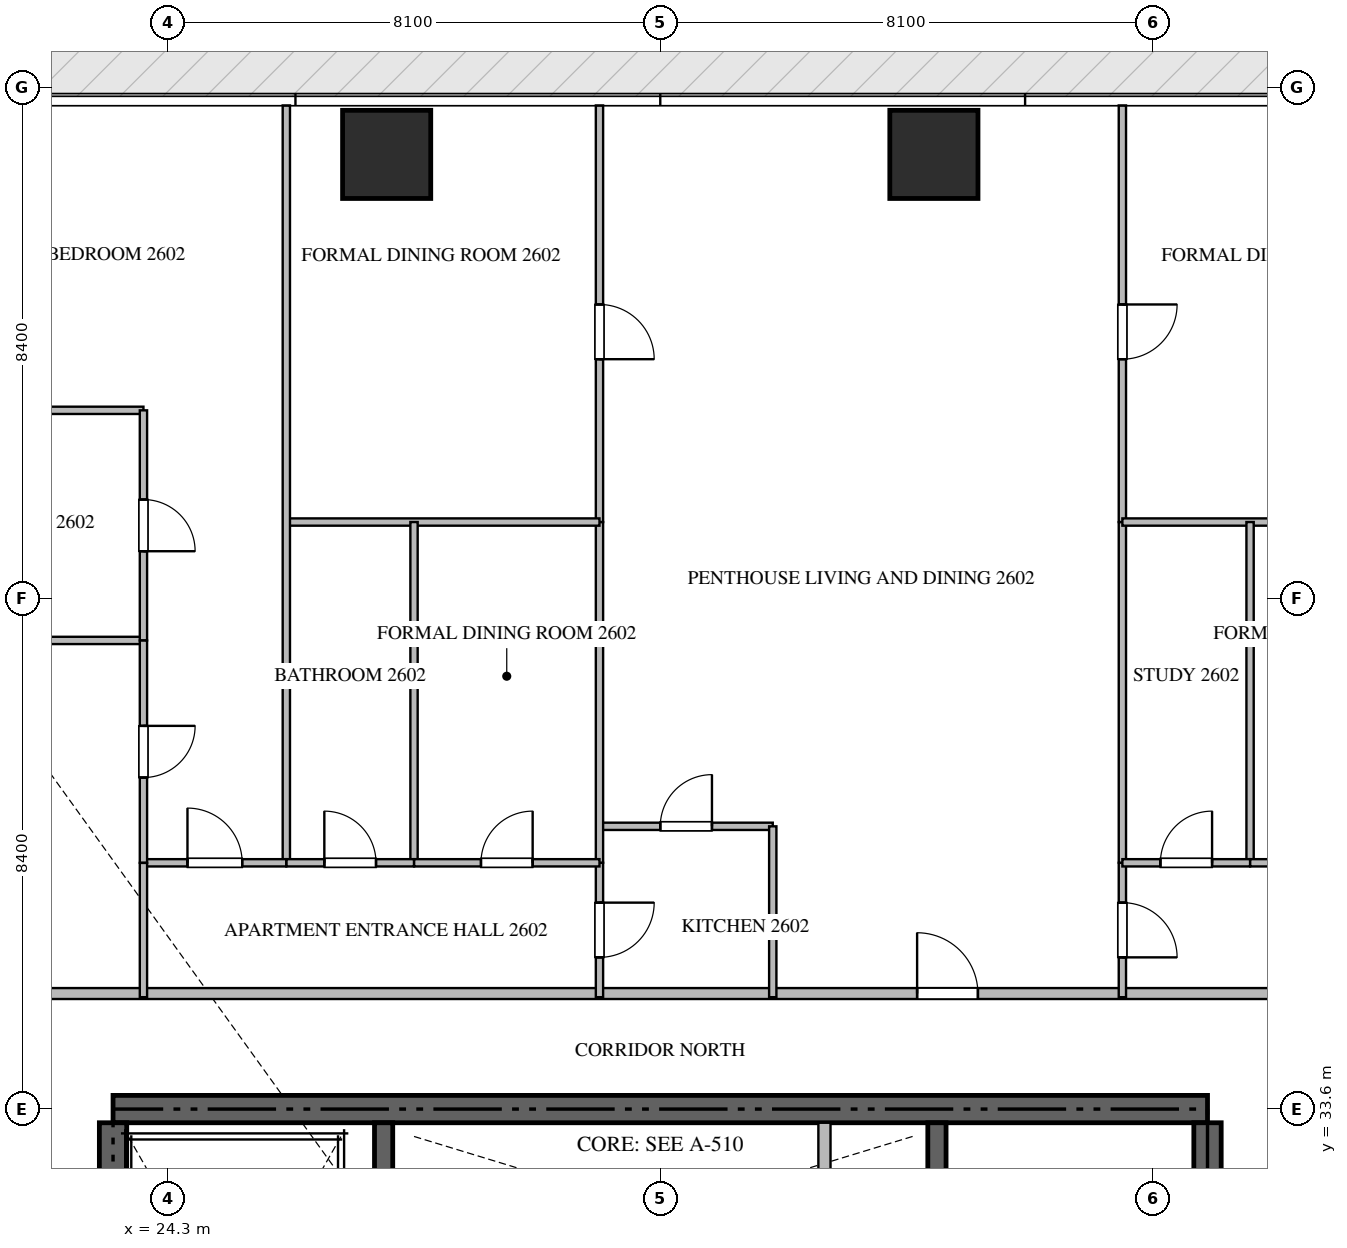
"""IFC4 building model, lengths in metres.
Left out: names, types, materials, properties, quantities, classifications, styles, units other than length and angle.
Written with IfcOpenShell. Run it as: python <this file> out.ifc"""

import sys

from ifc_helpers import new_model, si_unit, direction, frame, frame_2d, origin, origin_2d, place, context, subcontext, project, spatial, rectangle, extrude, source, transform, mapped, element, fill, save


model = new_model("IFC4")
c1 = context("Model", 3, precision=1e-05, world=origin(), true_north=direction((0.0, 1.0)))
c2 = subcontext(c1, "Body", "Model", "MODEL_VIEW")
j1 = project(units=[si_unit("LENGTHUNIT", "METRE"), si_unit("PLANEANGLEUNIT", "RADIAN")], contexts=[c1])
p1 = place(None, origin())
s1 = spatial("IfcSite", under=j1, at=p1, CompositionType="ELEMENT")
p2 = place(p1, origin())
s2 = spatial("IfcBuilding", under=s1, at=p2, CompositionType="ELEMENT")
p3 = place(p2, frame((0.0, 0.0, 105.45)))
s3 = spatial("IfcBuildingStorey", under=s2, at=p3, CompositionType="ELEMENT", Elevation=105.45)
p4 = place(p3, frame((41.4, 33.6, -0.26), z_axis=(0.0, 0.0, 1.0), x_axis=(-1.0, 0.0, 0.0)))
e1 = element("IfcWall", 1, at=p4, inside=s3, PredefinedType="SHEAR", context=c2, shape_type="SweptSolid", body=[
    extrude(rectangle(XDim=18.0, YDim=0.45, at=frame_2d((9.0, 0.0))), origin(), (0.0, 0.0, 1.0), 3.648),
])
p5 = place(p3, frame((23.4, 24.25, -0.26), z_axis=(0.0, 0.0, 1.0), x_axis=(0.0, 1.0, 0.0)))
e2 = element("IfcWall", 2, at=p5, inside=s3, PredefinedType="SHEAR", context=c2, shape_type="SweptSolid", body=[
    extrude(rectangle(XDim=9.125, YDim=0.45, at=frame_2d((4.562, 0.0))), origin(), (0.0, 0.0, 1.0), 3.648),
])
p6 = place(p3, frame((41.4, 27.75, -0.26), z_axis=(0.0, 0.0, 1.0), x_axis=(0.0, 1.0, 0.0)))
e3 = element("IfcWall", 3, at=p6, inside=s3, PredefinedType="SHEAR", context=c2, shape_type="SweptSolid", body=[
    extrude(rectangle(XDim=5.625, YDim=0.45, at=frame_2d((2.812, 0.0))), origin(), (0.0, 0.0, 1.0), 3.648),
])
p7 = place(p3, frame((27.85, 23.55, -0.26), z_axis=(0.0, 0.0, 1.0), x_axis=(0.0, 1.0, 0.0)))
e4 = element("IfcWall", 4, at=p7, inside=s3, PredefinedType="SHEAR", context=c2, shape_type="SweptSolid", body=[
    extrude(rectangle(XDim=9.825, YDim=0.3, at=frame_2d((4.913, 0.0))), origin(), (0.0, 0.0, 1.0), 3.648),
])
p8 = place(p3, frame((36.95, 27.05, -0.26), z_axis=(0.0, 0.0, 1.0), x_axis=(0.0, 1.0, 0.0)))
e5 = element("IfcWall", 5, at=p8, inside=s3, PredefinedType="SHEAR", context=c2, shape_type="SweptSolid", body=[
    extrude(rectangle(XDim=6.325, YDim=0.3, at=frame_2d((3.163, 0.0))), origin(), (0.0, 0.0, 1.0), 3.648),
])
m1 = source(origin(), c2, "Body", "SweptSolid", [
    extrude(rectangle(XDim=1.45, YDim=1.45, at=origin_2d()), origin(), (0.0, 0.0, 1.0), 3.65),
])
for number, where, z_axis, x_axis in (
    (6, (27.9, 49.3, -0.26), (0.0, 0.0, 1.0), (1.0, 0.0, 0.0)),
    (7, (36.9, 49.3, -0.26), (0.0, 0.0, 1.0), (1.0, 0.0, 0.0)),
):
    element("IfcColumn", number, at=place(p3, frame(where, z_axis=z_axis, x_axis=x_axis)), inside=s3, PredefinedType="COLUMN", context=c2, shape_type="MappedRepresentation", body=[
        mapped(m1, transform((0.0, 0.0, 0.0), scale=1.0)),
    ])
p9 = place(p3, frame((35.1, 30.75, 0.0), z_axis=(0.0, 0.0, 1.0), x_axis=(0.0, 1.0, 0.0)))
e8 = element("IfcWall", 8, at=p9, inside=s3, PredefinedType="STANDARD", context=c2, shape_type="SweptSolid", body=[
    extrude(rectangle(XDim=2.625, YDim=0.2, at=frame_2d((1.312, 0.0))), origin(), (0.0, 0.0, 1.0), 3.39),
])
p10 = place(p3, frame((21.402, 35.5, 0.0), z_axis=(0.0, 0.0, 1.0), x_axis=(1.0, 0.0, 0.0)))
e9 = element("IfcWall", 9, at=p10, inside=s3, PredefinedType="PARTITIONING", context=c2, shape_type="SweptSolid", body=[
    extrude(rectangle(XDim=21.996, YDim=0.18, at=frame_2d((10.998, 0.0))), origin(), (0.0, 0.0, 1.0), 3.39),
])
p11 = place(p10, frame((15.222, 0.0, 0.0)))
e10 = element("IfcOpeningElement", 10, at=p11, cuts=e9, PredefinedType="OPENING", context=c2, shape_type="SweptSolid", body=[
    extrude(rectangle(XDim=1.0, YDim=2.15, at=frame_2d((0.5, 1.075))), frame((0.0, 0.1, 0.0), z_axis=(0.0, -1.0, 0.0), x_axis=(1.0, 0.0, 0.0)), (0.0, 0.0, 1.0), 0.2),
])
p12 = place(p3, frame((31.4, 38.25, 0.0), z_axis=(0.0, 0.0, 1.0), x_axis=(1.0, 0.0, 0.0)))
e11 = element("IfcWall", 11, at=p12, inside=s3, PredefinedType="PARTITIONING", context=c2, shape_type="SweptSolid", body=[
    extrude(rectangle(XDim=2.85, YDim=0.12, at=frame_2d((1.425, 0.0))), origin(), (0.0, 0.0, 1.0), 3.39),
])
p13 = place(p12, frame((1.0, 0.0, 0.0)))
e12 = element("IfcOpeningElement", 12, at=p13, cuts=e11, PredefinedType="OPENING", context=c2, shape_type="SweptSolid", body=[
    extrude(rectangle(XDim=0.85, YDim=2.1, at=frame_2d((0.425, 1.05))), frame((0.0, 0.07, 0.0), z_axis=(0.0, -1.0, 0.0), x_axis=(1.0, 0.0, 0.0)), (0.0, 0.0, 1.0), 0.14),
])
p14 = place(p3, frame((34.25, 38.25, 0.0), z_axis=(0.0, 0.0, 1.0), x_axis=(0.0, -1.0, 0.0)))
e13 = element("IfcWall", 13, at=p14, inside=s3, PredefinedType="PARTITIONING", context=c2, shape_type="SweptSolid", body=[
    extrude(rectangle(XDim=2.81, YDim=0.12, at=frame_2d((1.405, 0.0))), origin(), (0.0, 0.0, 1.0), 3.39),
])
p15 = place(p3, frame((31.4, 37.65, 0.0), z_axis=(0.0, 0.0, 1.0), x_axis=(0.0, -1.0, 0.0)))
e14 = element("IfcWall", 14, at=p15, inside=s3, PredefinedType="PARTITIONING", context=c2, shape_type="SweptSolid", body=[
    extrude(rectangle(XDim=2.21, YDim=0.12, at=frame_2d((1.105, 0.0))), origin(), (0.0, 0.0, 1.0), 3.39),
])
p16 = place(p15, frame((0.655, 0.0, 0.0)))
e15 = element("IfcOpeningElement", 15, at=p16, cuts=e14, PredefinedType="OPENING", context=c2, shape_type="SweptSolid", body=[
    extrude(rectangle(XDim=0.9, YDim=2.1, at=frame_2d((0.45, 1.05))), frame((0.0, 0.07, 0.0), z_axis=(0.0, -1.0, 0.0), x_axis=(1.0, 0.0, 0.0)), (0.0, 0.0, 1.0), 0.14),
])
p17 = place(p3, frame((31.4, 50.105, 0.0), z_axis=(0.0, 0.0, 1.0), x_axis=(0.0, -1.0, 0.0)))
e16 = element("IfcWall", 16, at=p17, inside=s3, PredefinedType="PARTITIONING", context=c2, shape_type="SweptSolid", body=[
    extrude(rectangle(XDim=6.851, YDim=0.12, at=frame_2d((3.426, 0.0))), origin(), (0.0, 0.0, 1.0), 3.39),
])
p18 = place(p17, frame((3.273, 0.0, 0.0)))
e17 = element("IfcOpeningElement", 17, at=p18, cuts=e16, PredefinedType="OPENING", context=c2, shape_type="SweptSolid", body=[
    extrude(rectangle(XDim=0.9, YDim=2.1, at=frame_2d((0.45, 1.05))), frame((0.0, 0.07, 0.0), z_axis=(0.0, -1.0, 0.0), x_axis=(1.0, 0.0, 0.0)), (0.0, 0.0, 1.0), 0.14),
])
p19 = place(p3, frame((31.4, 43.252, 0.0), z_axis=(0.0, 0.0, 1.0), x_axis=(0.0, -1.0, 0.0)))
e18 = element("IfcWall", 18, at=p19, inside=s3, PredefinedType="PARTITIONING", context=c2, shape_type="SweptSolid", body=[
    extrude(rectangle(XDim=5.6, YDim=0.12, at=frame_2d((2.8, 0.0))), origin(), (0.0, 0.0, 1.0), 3.39),
])
p20 = place(p3, frame((26.25, 43.254, 0.0), z_axis=(0.0, 0.0, 1.0), x_axis=(1.0, 0.0, 0.0)))
e19 = element("IfcWall", 19, at=p20, inside=s3, PredefinedType="PARTITIONING", context=c2, shape_type="SweptSolid", body=[
    extrude(rectangle(XDim=5.15, YDim=0.12, at=frame_2d((2.575, 0.0))), origin(), (0.0, 0.0, 1.0), 3.39),
])
p21 = place(p3, frame((26.25, 50.105, 0.0), z_axis=(0.0, 0.0, 1.0), x_axis=(0.0, -1.0, 0.0)))
e20 = element("IfcWall", 20, at=p21, inside=s3, PredefinedType="PARTITIONING", context=c2, shape_type="SweptSolid", body=[
    extrude(rectangle(XDim=12.455, YDim=0.12, at=frame_2d((6.228, 0.0))), origin(), (0.0, 0.0, 1.0), 3.39),
])
p22 = place(p3, frame((28.35, 43.254, 0.0), z_axis=(0.0, 0.0, 1.0), x_axis=(0.0, -1.0, 0.0)))
e21 = element("IfcWall", 21, at=p22, inside=s3, PredefinedType="PARTITIONING", context=c2, shape_type="SweptSolid", body=[
    extrude(rectangle(XDim=5.604, YDim=0.12, at=frame_2d((2.802, 0.0))), origin(), (0.0, 0.0, 1.0), 3.39),
])
p23 = place(p3, frame((26.25, 37.65, 0.0), z_axis=(0.0, 0.0, 1.0), x_axis=(1.0, 0.0, 0.0)))
e22 = element("IfcWall", 22, at=p23, inside=s3, PredefinedType="PARTITIONING", context=c2, shape_type="SweptSolid", body=[
    extrude(rectangle(XDim=2.1, YDim=0.12, at=frame_2d((1.05, 0.0))), origin(), (0.0, 0.0, 1.0), 3.39),
])
p24 = place(p23, frame((0.625, 0.0, 0.0)))
e23 = element("IfcOpeningElement", 23, at=p24, cuts=e22, PredefinedType="OPENING", context=c2, shape_type="SweptSolid", body=[
    extrude(rectangle(XDim=0.85, YDim=2.1, at=frame_2d((0.425, 1.05))), frame((0.0, 0.07, 0.0), z_axis=(0.0, -1.0, 0.0), x_axis=(1.0, 0.0, 0.0)), (0.0, 0.0, 1.0), 0.14),
])
p25 = place(p3, frame((28.352, 37.65, 0.0), z_axis=(0.0, 0.0, 1.0), x_axis=(1.0, 0.0, 0.0)))
e24 = element("IfcWall", 24, at=p25, inside=s3, PredefinedType="PARTITIONING", context=c2, shape_type="SweptSolid", body=[
    extrude(rectangle(XDim=3.048, YDim=0.12, at=frame_2d((1.524, 0.0))), origin(), (0.0, 0.0, 1.0), 3.39),
])
p26 = place(p25, frame((1.099, 0.0, 0.0)))
e25 = element("IfcOpeningElement", 25, at=p26, cuts=e24, PredefinedType="OPENING", context=c2, shape_type="SweptSolid", body=[
    extrude(rectangle(XDim=0.85, YDim=2.1, at=frame_2d((0.425, 1.05))), frame((0.0, 0.07, 0.0), z_axis=(0.0, -1.0, 0.0), x_axis=(1.0, 0.0, 0.0)), (0.0, 0.0, 1.0), 0.14),
])
p27 = place(p3, frame((23.9, 37.65, 0.0), z_axis=(0.0, 0.0, 1.0), x_axis=(1.0, 0.0, 0.0)))
e26 = element("IfcWall", 26, at=p27, inside=s3, PredefinedType="PARTITIONING", context=c2, shape_type="SweptSolid", body=[
    extrude(rectangle(XDim=2.348, YDim=0.12, at=frame_2d((1.174, 0.0))), origin(), (0.0, 0.0, 1.0), 3.39),
])
p28 = place(p27, frame((0.724, 0.0, 0.0)))
e27 = element("IfcOpeningElement", 27, at=p28, cuts=e26, PredefinedType="OPENING", context=c2, shape_type="SweptSolid", body=[
    extrude(rectangle(XDim=0.9, YDim=2.1, at=frame_2d((0.45, 1.05))), frame((0.0, 0.07, 0.0), z_axis=(0.0, -1.0, 0.0), x_axis=(1.0, 0.0, 0.0)), (0.0, 0.0, 1.0), 0.14),
])
for number, where, z_axis, x_axis in (
    (28, (20.2, 45.091, 0.0), (0.0, 0.0, 1.0), (1.0, 0.0, 0.0)),
    (29, (20.2, 41.307, 0.0), (0.0, 0.0, 1.0), (1.0, 0.0, 0.0)),
):
    element("IfcWall", number, at=place(p3, frame(where, z_axis=z_axis, x_axis=x_axis)), inside=s3, PredefinedType="PARTITIONING", context=c2, shape_type="SweptSolid", body=[
        extrude(rectangle(XDim=3.7, YDim=0.12, at=frame_2d((1.85, 0.0))), origin(), (0.0, 0.0, 1.0), 3.39),
    ])
p29 = place(p3, frame((23.9, 45.091, 0.0), z_axis=(0.0, 0.0, 1.0), x_axis=(0.0, -1.0, 0.0)))
e30 = element("IfcWall", 30, at=p29, inside=s3, PredefinedType="PARTITIONING", context=c2, shape_type="SweptSolid", body=[
    extrude(rectangle(XDim=3.784, YDim=0.12, at=frame_2d((1.892, 0.0))), origin(), (0.0, 0.0, 1.0), 3.39),
])
p30 = place(p29, frame((1.467, 0.0, 0.0)))
e31 = element("IfcOpeningElement", 31, at=p30, cuts=e30, PredefinedType="OPENING", context=c2, shape_type="SweptSolid", body=[
    extrude(rectangle(XDim=0.85, YDim=2.1, at=frame_2d((0.425, 1.05))), frame((0.0, 0.07, 0.0), z_axis=(0.0, -1.0, 0.0), x_axis=(1.0, 0.0, 0.0)), (0.0, 0.0, 1.0), 0.14),
])
p31 = place(p3, frame((23.9, 41.305, 0.0), z_axis=(0.0, 0.0, 1.0), x_axis=(0.0, -1.0, 0.0)))
e32 = element("IfcWall", 32, at=p31, inside=s3, PredefinedType="PARTITIONING", context=c2, shape_type="SweptSolid", body=[
    extrude(rectangle(XDim=3.655, YDim=0.12, at=frame_2d((1.828, 0.0))), origin(), (0.0, 0.0, 1.0), 3.39),
])
p32 = place(p31, frame((1.403, 0.0, 0.0)))
e33 = element("IfcOpeningElement", 33, at=p32, cuts=e32, PredefinedType="OPENING", context=c2, shape_type="SweptSolid", body=[
    extrude(rectangle(XDim=0.85, YDim=2.1, at=frame_2d((0.425, 1.05))), frame((0.0, 0.07, 0.0), z_axis=(0.0, -1.0, 0.0), x_axis=(1.0, 0.0, 0.0)), (0.0, 0.0, 1.0), 0.14),
])
p33 = place(p3, frame((23.9, 37.648, 0.0), z_axis=(0.0, 0.0, 1.0), x_axis=(0.0, -1.0, 0.0)))
e34 = element("IfcWall", 34, at=p33, inside=s3, PredefinedType="PARTITIONING", context=c2, shape_type="SweptSolid", body=[
    extrude(rectangle(XDim=2.208, YDim=0.12, at=frame_2d((1.104, 0.0))), origin(), (0.0, 0.0, 1.0), 3.39),
])
p34 = place(p3, frame((40.0, 37.65, 0.0), z_axis=(0.0, 0.0, 1.0), x_axis=(0.0, -1.0, 0.0)))
e35 = element("IfcWall", 35, at=p34, inside=s3, PredefinedType="PARTITIONING", context=c2, shape_type="SweptSolid", body=[
    extrude(rectangle(XDim=2.21, YDim=0.12, at=frame_2d((1.105, 0.0))), origin(), (0.0, 0.0, 1.0), 3.39),
])
p35 = place(p34, frame((0.655, 0.0, 0.0)))
e36 = element("IfcOpeningElement", 36, at=p35, cuts=e35, PredefinedType="OPENING", context=c2, shape_type="SweptSolid", body=[
    extrude(rectangle(XDim=0.9, YDim=2.1, at=frame_2d((0.45, 1.05))), frame((0.0, 0.07, 0.0), z_axis=(0.0, -1.0, 0.0), x_axis=(1.0, 0.0, 0.0)), (0.0, 0.0, 1.0), 0.14),
])
p36 = place(p3, frame((40.0, 50.105, 0.0), z_axis=(0.0, 0.0, 1.0), x_axis=(0.0, -1.0, 0.0)))
e37 = element("IfcWall", 37, at=p36, inside=s3, PredefinedType="PARTITIONING", context=c2, shape_type="SweptSolid", body=[
    extrude(rectangle(XDim=6.851, YDim=0.12, at=frame_2d((3.426, 0.0))), origin(), (0.0, 0.0, 1.0), 3.39),
])
p37 = place(p36, frame((3.273, 0.0, 0.0)))
e38 = element("IfcOpeningElement", 38, at=p37, cuts=e37, PredefinedType="OPENING", context=c2, shape_type="SweptSolid", body=[
    extrude(rectangle(XDim=0.9, YDim=2.1, at=frame_2d((0.45, 1.05))), frame((0.0, 0.07, 0.0), z_axis=(0.0, -1.0, 0.0), x_axis=(1.0, 0.0, 0.0)), (0.0, 0.0, 1.0), 0.14),
])
p38 = place(p3, frame((40.0, 43.252, 0.0), z_axis=(0.0, 0.0, 1.0), x_axis=(0.0, -1.0, 0.0)))
e39 = element("IfcWall", 39, at=p38, inside=s3, PredefinedType="PARTITIONING", context=c2, shape_type="SweptSolid", body=[
    extrude(rectangle(XDim=5.6, YDim=0.12, at=frame_2d((2.8, 0.0))), origin(), (0.0, 0.0, 1.0), 3.39),
])
p39 = place(p3, frame((40.0, 43.254, 0.0), z_axis=(0.0, 0.0, 1.0), x_axis=(1.0, 0.0, 0.0)))
e40 = element("IfcWall", 40, at=p39, inside=s3, PredefinedType="PARTITIONING", context=c2, shape_type="SweptSolid", body=[
    extrude(rectangle(XDim=5.15, YDim=0.12, at=frame_2d((2.575, 0.0))), origin(), (0.0, 0.0, 1.0), 3.39),
])
p40 = place(p3, frame((42.1, 43.254, 0.0), z_axis=(0.0, 0.0, 1.0), x_axis=(0.0, -1.0, 0.0)))
e41 = element("IfcWall", 41, at=p40, inside=s3, PredefinedType="PARTITIONING", context=c2, shape_type="SweptSolid", body=[
    extrude(rectangle(XDim=5.604, YDim=0.12, at=frame_2d((2.802, 0.0))), origin(), (0.0, 0.0, 1.0), 3.39),
])
p41 = place(p3, frame((40.0, 37.65, 0.0), z_axis=(0.0, 0.0, 1.0), x_axis=(1.0, 0.0, 0.0)))
e42 = element("IfcWall", 42, at=p41, inside=s3, PredefinedType="PARTITIONING", context=c2, shape_type="SweptSolid", body=[
    extrude(rectangle(XDim=2.1, YDim=0.12, at=frame_2d((1.05, 0.0))), origin(), (0.0, 0.0, 1.0), 3.39),
])
p42 = place(p41, frame((0.625, 0.0, 0.0)))
e43 = element("IfcOpeningElement", 43, at=p42, cuts=e42, PredefinedType="OPENING", context=c2, shape_type="SweptSolid", body=[
    extrude(rectangle(XDim=0.85, YDim=2.1, at=frame_2d((0.425, 1.05))), frame((0.0, 0.07, 0.0), z_axis=(0.0, -1.0, 0.0), x_axis=(1.0, 0.0, 0.0)), (0.0, 0.0, 1.0), 0.14),
])
p43 = place(p3, frame((42.102, 37.65, 0.0), z_axis=(0.0, 0.0, 1.0), x_axis=(1.0, 0.0, 0.0)))
e44 = element("IfcWall", 44, at=p43, inside=s3, PredefinedType="PARTITIONING", context=c2, shape_type="SweptSolid", body=[
    extrude(rectangle(XDim=3.048, YDim=0.12, at=frame_2d((1.524, 0.0))), origin(), (0.0, 0.0, 1.0), 3.39),
])
p44 = place(p43, frame((1.099, 0.0, 0.0)))
e45 = element("IfcOpeningElement", 45, at=p44, cuts=e44, PredefinedType="OPENING", context=c2, shape_type="SweptSolid", body=[
    extrude(rectangle(XDim=0.85, YDim=2.1, at=frame_2d((0.425, 1.05))), frame((0.0, 0.07, 0.0), z_axis=(0.0, -1.0, 0.0), x_axis=(1.0, 0.0, 0.0)), (0.0, 0.0, 1.0), 0.14),
])
m2 = source(origin(), c2, "Body", "SweptSolid", [
    extrude(rectangle(XDim=1.0, YDim=2.15, at=frame_2d((0.5, 1.075))), frame((0.0, 0.025, 0.0), z_axis=(0.0, -1.0, 0.0), x_axis=(1.0, 0.0, 0.0)), (0.0, 0.0, 1.0), 0.05),
])
p45 = place(p11, origin())
e46 = element("IfcDoor", 46, at=p45, inside=s3, OperationType="SINGLE_SWING_LEFT", PredefinedType="DOOR", context=c2, shape_type="MappedRepresentation", body=[
    mapped(m2, transform((0.0, 0.0, 0.0), scale=1.0)),
])
fill(e10, e46)
m3 = source(origin(), c2, "Body", "SweptSolid", [
    extrude(rectangle(XDim=0.85, YDim=2.1, at=frame_2d((0.425, 1.05))), frame((0.0, 0.025, 0.0), z_axis=(0.0, -1.0, 0.0), x_axis=(1.0, 0.0, 0.0)), (0.0, 0.0, 1.0), 0.05),
])
p46 = place(p13, origin())
e47 = element("IfcDoor", 47, at=p46, inside=s3, OperationType="SINGLE_SWING_RIGHT", PredefinedType="DOOR", context=c2, shape_type="MappedRepresentation", body=[
    mapped(m3, transform((0.0, 0.0, 0.0), scale=1.0)),
])
fill(e12, e47)
m4 = source(origin(), c2, "Body", "SweptSolid", [
    extrude(rectangle(XDim=0.9, YDim=2.1, at=frame_2d((0.45, 1.05))), frame((0.0, 0.025, 0.0), z_axis=(0.0, -1.0, 0.0), x_axis=(1.0, 0.0, 0.0)), (0.0, 0.0, 1.0), 0.05),
])
p47 = place(p16, origin())
e48 = element("IfcDoor", 48, at=p47, inside=s3, OperationType="SINGLE_SWING_LEFT", PredefinedType="DOOR", context=c2, shape_type="MappedRepresentation", body=[
    mapped(m4, transform((0.0, 0.0, 0.0), scale=1.0)),
])
fill(e15, e48)
p48 = place(p18, origin())
e49 = element("IfcDoor", 49, at=p48, inside=s3, OperationType="SINGLE_SWING_RIGHT", PredefinedType="DOOR", context=c2, shape_type="MappedRepresentation", body=[
    mapped(m4, transform((0.0, 0.0, 0.0), scale=1.0)),
])
fill(e17, e49)
p49 = place(p24, origin())
e50 = element("IfcDoor", 50, at=p49, inside=s3, OperationType="SINGLE_SWING_LEFT", PredefinedType="DOOR", context=c2, shape_type="MappedRepresentation", body=[
    mapped(m3, transform((0.0, 0.0, 0.0), scale=1.0)),
])
fill(e23, e50)
p50 = place(p26, origin())
e51 = element("IfcDoor", 51, at=p50, inside=s3, OperationType="SINGLE_SWING_RIGHT", PredefinedType="DOOR", context=c2, shape_type="MappedRepresentation", body=[
    mapped(m3, transform((0.0, 0.0, 0.0), scale=1.0)),
])
fill(e25, e51)
p51 = place(p28, origin())
e52 = element("IfcDoor", 52, at=p51, inside=s3, OperationType="SINGLE_SWING_LEFT", PredefinedType="DOOR", context=c2, shape_type="MappedRepresentation", body=[
    mapped(m4, transform((0.0, 0.0, 0.0), scale=1.0)),
])
fill(e27, e52)
p52 = place(p30, origin())
e53 = element("IfcDoor", 53, at=p52, inside=s3, OperationType="SINGLE_SWING_RIGHT", PredefinedType="DOOR", context=c2, shape_type="MappedRepresentation", body=[
    mapped(m3, transform((0.0, 0.0, 0.0), scale=1.0)),
])
fill(e31, e53)
p53 = place(p32, origin())
e54 = element("IfcDoor", 54, at=p53, inside=s3, OperationType="SINGLE_SWING_LEFT", PredefinedType="DOOR", context=c2, shape_type="MappedRepresentation", body=[
    mapped(m3, transform((0.0, 0.0, 0.0), scale=1.0)),
])
fill(e33, e54)
p54 = place(p35, origin())
e55 = element("IfcDoor", 55, at=p54, inside=s3, OperationType="SINGLE_SWING_RIGHT", PredefinedType="DOOR", context=c2, shape_type="MappedRepresentation", body=[
    mapped(m4, transform((0.0, 0.0, 0.0), scale=1.0)),
])
fill(e36, e55)
p55 = place(p37, origin())
e56 = element("IfcDoor", 56, at=p55, inside=s3, OperationType="SINGLE_SWING_LEFT", PredefinedType="DOOR", context=c2, shape_type="MappedRepresentation", body=[
    mapped(m4, transform((0.0, 0.0, 0.0), scale=1.0)),
])
fill(e38, e56)
p56 = place(p42, origin())
e57 = element("IfcDoor", 57, at=p56, inside=s3, OperationType="SINGLE_SWING_RIGHT", PredefinedType="DOOR", context=c2, shape_type="MappedRepresentation", body=[
    mapped(m3, transform((0.0, 0.0, 0.0), scale=1.0)),
])
fill(e43, e57)
save(model, sys.argv[1])
